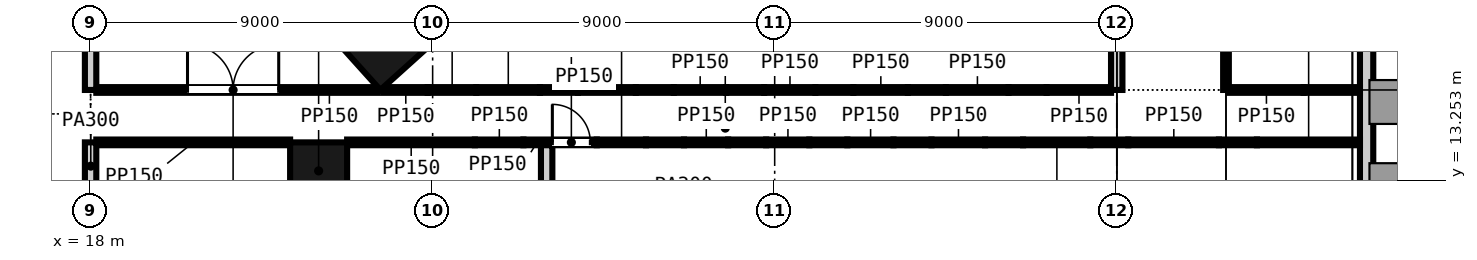
"""IFC4 building model, lengths in metres.
Left out: names, types, materials, properties, quantities, classifications, styles, units other than length and angle.
Written with IfcOpenShell. Run it as: python <this file> out.ifc"""

import sys

from ifc_helpers import new_model, si_unit, direction, frame, frame_2d, origin, origin_2d, place, context, subcontext, project, spatial, rectangle, extrude, element, fill, save


model = new_model("IFC4")
c1 = context("Model", 3, precision=1e-05, world=origin(), true_north=direction((0.0, 1.0)))
c2 = subcontext(c1, "Body", "Model", "MODEL_VIEW")
j1 = project(units=[si_unit("LENGTHUNIT", "METRE"), si_unit("PLANEANGLEUNIT", "RADIAN")], contexts=[c1])
p1 = place(None, origin())
s1 = spatial("IfcSite", under=j1, at=p1, CompositionType="ELEMENT")
p2 = place(p1, origin())
s2 = spatial("IfcBuilding", under=s1, at=p2, CompositionType="ELEMENT")
p3 = place(p2, frame((0.0, 0.0, 9.0)))
s3 = spatial("IfcBuildingStorey", under=s2, at=p3, CompositionType="ELEMENT", Elevation=9.0)
p4 = place(p3, frame((25.691, 16.9, -0.4), z_axis=(0.0, 0.0, 1.0), x_axis=(-0.669130606359, 0.743144825477, 0.0)))
e1 = element("IfcColumn", 1, at=p4, inside=s3, PredefinedType="COLUMN", context=c2, shape_type="SweptSolid", body=[
    extrude(rectangle(XDim=1.8, YDim=1.8, at=origin_2d()), origin(), (0.0, 0.0, 1.0), 9.0),
])
p5 = place(p3, frame((24.0, 13.5, -0.4), z_axis=(0.0, 0.0, 1.0), x_axis=(1.0, 0.0, 0.0)))
e2 = element("IfcColumn", 2, at=p5, inside=s3, PredefinedType="COLUMN", context=c2, shape_type="SweptSolid", body=[
    extrude(rectangle(XDim=1.5, YDim=1.5, at=origin_2d()), origin(), (0.0, 0.0, 1.0), 9.0),
])
p6 = place(p3, frame((51.575, 9.25, -0.4), z_axis=(0.0, 0.0, 1.0), x_axis=(0.0, 1.0, 0.0)))
e3 = element("IfcWall", 3, at=p6, inside=s3, PredefinedType="SOLIDWALL", context=c2, shape_type="SweptSolid", body=[
    extrude(rectangle(XDim=7.75, YDim=0.35, at=frame_2d((3.875, 0.0))), origin(), (0.0, 0.0, 1.0), 8.1),
])
p7 = place(p3, frame((18.15, 14.25, 0.0), z_axis=(0.0, 0.0, 1.0), x_axis=(1.0, 0.0, 0.0)))
e4 = element("IfcWall", 4, at=p7, inside=s3, PredefinedType="PARTITIONING", context=c2, shape_type="SweptSolid", body=[
    extrude(rectangle(XDim=5.1, YDim=0.15, at=frame_2d((2.55, 0.0))), origin(), (0.0, 0.0, 1.0), 8.6),
])
p8 = place(p3, frame((24.75, 14.25, 0.0), z_axis=(0.0, 0.0, 1.0), x_axis=(1.0, 0.0, 0.0)))
e5 = element("IfcWall", 5, at=p8, inside=s3, PredefinedType="PARTITIONING", context=c2, shape_type="SweptSolid", body=[
    extrude(rectangle(XDim=3.361, YDim=0.15, at=frame_2d((1.681, 0.0))), origin(), (0.0, 0.0, 1.0), 8.6),
])
p9 = place(p3, frame((28.111, 14.25, 0.0), z_axis=(0.0, 0.0, 1.0), x_axis=(1.0, 0.0, 0.0)))
e6 = element("IfcWall", 6, at=p9, inside=s3, PredefinedType="PARTITIONING", context=c2, shape_type="SweptSolid", body=[
    extrude(rectangle(XDim=1.278, YDim=0.15, at=frame_2d((0.639, 0.0))), origin(), (0.0, 0.0, 1.0), 7.6),
])
p10 = place(p3, frame((29.389, 14.25, 0.0), z_axis=(0.0, 0.0, 1.0), x_axis=(1.0, 0.0, 0.0)))
e7 = element("IfcWall", 7, at=p10, inside=s3, PredefinedType="PARTITIONING", context=c2, shape_type="SweptSolid", body=[
    extrude(rectangle(XDim=1.929, YDim=0.15, at=frame_2d((0.965, 0.0))), origin(), (0.0, 0.0, 1.0), 7.511),
])
p11 = place(p10, frame((0.76, 0.0, 0.0)))
e8 = element("IfcOpeningElement", 8, at=p11, cuts=e7, PredefinedType="OPENING", context=c2, shape_type="SweptSolid", body=[
    extrude(rectangle(XDim=1.0, YDim=2.1, at=frame_2d((0.5, 1.05))), frame((0.0, 0.085, 0.0), z_axis=(0.0, -1.0, 0.0), x_axis=(1.0, 0.0, 0.0)), (0.0, 0.0, 1.0), 0.17),
])
p12 = place(p3, frame((31.319, 14.25, 0.0), z_axis=(0.0, 0.0, 1.0), x_axis=(1.0, 0.0, 0.0)))
e9 = element("IfcWall", 9, at=p12, inside=s3, PredefinedType="PARTITIONING", context=c2, shape_type="SweptSolid", body=[
    extrude(rectangle(XDim=1.295, YDim=0.15, at=frame_2d((0.648, 0.0))), origin(), (0.0, 0.0, 1.0), 8.6),
])
p13 = place(p3, frame((32.614, 14.25, 0.0), z_axis=(0.0, 0.0, 1.0), x_axis=(1.0, 0.0, 0.0)))
e10 = element("IfcWall", 10, at=p13, inside=s3, PredefinedType="PARTITIONING", context=c2, shape_type="SweptSolid", body=[
    extrude(rectangle(XDim=1.0, YDim=0.15, at=frame_2d((0.5, 0.0))), origin(), (0.0, 0.0, 1.0), 7.511),
])
p14 = place(p3, frame((33.614, 14.25, 0.0), z_axis=(0.0, 0.0, 1.0), x_axis=(1.0, 0.0, 0.0)))
e11 = element("IfcWall", 11, at=p14, inside=s3, PredefinedType="PARTITIONING", context=c2, shape_type="SweptSolid", body=[
    extrude(rectangle(XDim=1.162, YDim=0.15, at=frame_2d((0.581, 0.0))), origin(), (0.0, 0.0, 1.0), 8.6),
])
p15 = place(p3, frame((34.776, 14.25, 0.0), z_axis=(0.0, 0.0, 1.0), x_axis=(1.0, 0.0, 0.0)))
e12 = element("IfcWall", 12, at=p15, inside=s3, PredefinedType="PARTITIONING", context=c2, shape_type="SweptSolid", body=[
    extrude(rectangle(XDim=1.0, YDim=0.15, at=frame_2d((0.5, 0.0))), origin(), (0.0, 0.0, 1.0), 7.511),
])
p16 = place(p3, frame((35.776, 14.25, 0.0), z_axis=(0.0, 0.0, 1.0), x_axis=(1.0, 0.0, 0.0)))
e13 = element("IfcWall", 13, at=p16, inside=s3, PredefinedType="PARTITIONING", context=c2, shape_type="SweptSolid", body=[
    extrude(rectangle(XDim=1.136, YDim=0.15, at=frame_2d((0.568, 0.0))), origin(), (0.0, 0.0, 1.0), 8.6),
])
p17 = place(p3, frame((36.912, 14.25, 0.0), z_axis=(0.0, 0.0, 1.0), x_axis=(1.0, 0.0, 0.0)))
e14 = element("IfcWall", 14, at=p17, inside=s3, PredefinedType="PARTITIONING", context=c2, shape_type="SweptSolid", body=[
    extrude(rectangle(XDim=1.0, YDim=0.15, at=frame_2d((0.5, 0.0))), origin(), (0.0, 0.0, 1.0), 7.511),
])
p18 = place(p3, frame((37.912, 14.25, 0.0), z_axis=(0.0, 0.0, 1.0), x_axis=(1.0, 0.0, 0.0)))
e15 = element("IfcWall", 15, at=p18, inside=s3, PredefinedType="PARTITIONING", context=c2, shape_type="SweptSolid", body=[
    extrude(rectangle(XDim=1.214, YDim=0.15, at=frame_2d((0.607, 0.0))), origin(), (0.0, 0.0, 1.0), 8.6),
])
p19 = place(p3, frame((39.126, 14.25, 0.0), z_axis=(0.0, 0.0, 1.0), x_axis=(1.0, 0.0, 0.0)))
e16 = element("IfcWall", 16, at=p19, inside=s3, PredefinedType="PARTITIONING", context=c2, shape_type="SweptSolid", body=[
    extrude(rectangle(XDim=1.0, YDim=0.15, at=frame_2d((0.5, 0.0))), origin(), (0.0, 0.0, 1.0), 7.511),
])
p20 = place(p3, frame((40.126, 14.25, 0.0), z_axis=(0.0, 0.0, 1.0), x_axis=(1.0, 0.0, 0.0)))
e17 = element("IfcWall", 17, at=p20, inside=s3, PredefinedType="PARTITIONING", context=c2, shape_type="SweptSolid", body=[
    extrude(rectangle(XDim=1.41, YDim=0.15, at=frame_2d((0.705, 0.0))), origin(), (0.0, 0.0, 1.0), 8.6),
])
p21 = place(p3, frame((41.536, 14.25, 0.0), z_axis=(0.0, 0.0, 1.0), x_axis=(1.0, 0.0, 0.0)))
e18 = element("IfcWall", 18, at=p21, inside=s3, PredefinedType="PARTITIONING", context=c2, shape_type="SweptSolid", body=[
    extrude(rectangle(XDim=1.0, YDim=0.15, at=frame_2d((0.5, 0.0))), origin(), (0.0, 0.0, 1.0), 7.511),
])
p22 = place(p3, frame((42.536, 14.25, 0.0), z_axis=(0.0, 0.0, 1.0), x_axis=(1.0, 0.0, 0.0)))
e19 = element("IfcWall", 19, at=p22, inside=s3, PredefinedType="PARTITIONING", context=c2, shape_type="SweptSolid", body=[
    extrude(rectangle(XDim=1.769, YDim=0.15, at=frame_2d((0.884, 0.0))), origin(), (0.0, 0.0, 1.0), 8.6),
])
p23 = place(p3, frame((44.305, 14.25, 0.0), z_axis=(0.0, 0.0, 1.0), x_axis=(1.0, 0.0, 0.0)))
e20 = element("IfcWall", 20, at=p23, inside=s3, PredefinedType="PARTITIONING", context=c2, shape_type="SweptSolid", body=[
    extrude(rectangle(XDim=1.0, YDim=0.15, at=frame_2d((0.5, 0.0))), origin(), (0.0, 0.0, 1.0), 7.511),
])
p24 = place(p3, frame((45.305, 14.25, 0.0), z_axis=(0.0, 0.0, 1.0), x_axis=(1.0, 0.0, 0.0)))
e21 = element("IfcWall", 21, at=p24, inside=s3, PredefinedType="PARTITIONING", context=c2, shape_type="SweptSolid", body=[
    extrude(rectangle(XDim=2.384, YDim=0.15, at=frame_2d((1.192, 0.0))), origin(), (0.0, 0.0, 1.0), 8.6),
])
p25 = place(p3, frame((47.689, 14.25, 0.0), z_axis=(0.0, 0.0, 1.0), x_axis=(1.0, 0.0, 0.0)))
e22 = element("IfcWall", 22, at=p25, inside=s3, PredefinedType="PARTITIONING", context=c2, shape_type="SweptSolid", body=[
    extrude(rectangle(XDim=1.0, YDim=0.15, at=frame_2d((0.5, 0.0))), origin(), (0.0, 0.0, 1.0), 7.686),
])
p26 = place(p3, frame((48.689, 14.25, 0.0), z_axis=(0.0, 0.0, 1.0), x_axis=(1.0, 0.0, 0.0)))
e23 = element("IfcWall", 23, at=p26, inside=s3, PredefinedType="PARTITIONING", context=c2, shape_type="SweptSolid", body=[
    extrude(rectangle(XDim=2.711, YDim=0.15, at=frame_2d((1.355, 0.0))), origin(), (0.0, 0.0, 1.0), 8.6),
])
p27 = place(p3, frame((18.15, 15.629, 0.0), z_axis=(0.0, 0.0, 1.0), x_axis=(1.0, 0.0, 0.0)))
e24 = element("IfcWall", 24, at=p27, inside=s3, PredefinedType="PARTITIONING", context=c2, shape_type="SweptSolid", body=[
    extrude(rectangle(XDim=7.407, YDim=0.15, at=frame_2d((3.704, 0.0))), origin(), (0.0, 0.0, 1.0), 8.6),
])
p28 = place(p27, frame((2.4, 0.0, 0.0)))
e25 = element("IfcOpeningElement", 25, at=p28, cuts=e24, PredefinedType="OPENING", context=c2, shape_type="SweptSolid", body=[
    extrude(rectangle(XDim=2.4, YDim=2.4, at=frame_2d((1.2, 1.2))), frame((0.0, 0.085, 0.0), z_axis=(0.0, -1.0, 0.0), x_axis=(1.0, 0.0, 0.0)), (0.0, 0.0, 1.0), 0.17),
])
p29 = place(p3, frame((25.708, 15.629, 0.0), z_axis=(0.0, 0.0, 1.0), x_axis=(1.0, 0.0, 0.0)))
e26 = element("IfcWall", 26, at=p29, inside=s3, PredefinedType="PARTITIONING", context=c2, shape_type="SweptSolid", body=[
    extrude(rectangle(XDim=1.162, YDim=0.15, at=frame_2d((0.581, 0.0))), origin(), (0.0, 0.0, 1.0), 8.6),
])
p30 = place(p3, frame((26.869, 15.629, 0.0), z_axis=(0.0, 0.0, 1.0), x_axis=(1.0, 0.0, 0.0)))
e27 = element("IfcWall", 27, at=p30, inside=s3, PredefinedType="PARTITIONING", context=c2, shape_type="SweptSolid", body=[
    extrude(rectangle(XDim=1.278, YDim=0.15, at=frame_2d((0.639, 0.0))), origin(), (0.0, 0.0, 1.0), 7.6),
])
p31 = place(p3, frame((28.148, 15.629, 0.0), z_axis=(0.0, 0.0, 1.0), x_axis=(1.0, 0.0, 0.0)))
e28 = element("IfcWall", 28, at=p31, inside=s3, PredefinedType="PARTITIONING", context=c2, shape_type="SweptSolid", body=[
    extrude(rectangle(XDim=1.676, YDim=0.15, at=frame_2d((0.838, 0.0))), origin(), (0.0, 0.0, 1.0), 8.6),
])
p32 = place(p3, frame((29.823, 15.629, 0.0), z_axis=(0.0, 0.0, 1.0), x_axis=(1.0, 0.0, 0.0)))
e29 = element("IfcWall", 29, at=p32, inside=s3, PredefinedType="PARTITIONING", context=c2, shape_type="SweptSolid", body=[
    extrude(rectangle(XDim=1.0, YDim=0.15, at=frame_2d((0.5, 0.0))), origin(), (0.0, 0.0, 1.0), 7.511),
])
p33 = place(p3, frame((30.823, 15.629, 0.0), z_axis=(0.0, 0.0, 1.0), x_axis=(1.0, 0.0, 0.0)))
e30 = element("IfcWall", 30, at=p33, inside=s3, PredefinedType="PARTITIONING", context=c2, shape_type="SweptSolid", body=[
    extrude(rectangle(XDim=1.523, YDim=0.15, at=frame_2d((0.762, 0.0))), origin(), (0.0, 0.0, 1.0), 8.6),
])
p34 = place(p3, frame((32.346, 15.629, 0.0), z_axis=(0.0, 0.0, 1.0), x_axis=(1.0, 0.0, 0.0)))
e31 = element("IfcWall", 31, at=p34, inside=s3, PredefinedType="PARTITIONING", context=c2, shape_type="SweptSolid", body=[
    extrude(rectangle(XDim=1.0, YDim=0.15, at=frame_2d((0.5, 0.0))), origin(), (0.0, 0.0, 1.0), 7.511),
])
p35 = place(p3, frame((33.346, 15.629, 0.0), z_axis=(0.0, 0.0, 1.0), x_axis=(1.0, 0.0, 0.0)))
e32 = element("IfcWall", 32, at=p35, inside=s3, PredefinedType="PARTITIONING", context=c2, shape_type="SweptSolid", body=[
    extrude(rectangle(XDim=1.376, YDim=0.15, at=frame_2d((0.688, 0.0))), origin(), (0.0, 0.0, 1.0), 8.6),
])
p36 = place(p3, frame((34.723, 15.629, 0.0), z_axis=(0.0, 0.0, 1.0), x_axis=(1.0, 0.0, 0.0)))
e33 = element("IfcWall", 33, at=p36, inside=s3, PredefinedType="PARTITIONING", context=c2, shape_type="SweptSolid", body=[
    extrude(rectangle(XDim=1.0, YDim=0.15, at=frame_2d((0.5, 0.0))), origin(), (0.0, 0.0, 1.0), 7.511),
])
p37 = place(p3, frame((35.723, 15.629, 0.0), z_axis=(0.0, 0.0, 1.0), x_axis=(1.0, 0.0, 0.0)))
e34 = element("IfcWall", 34, at=p37, inside=s3, PredefinedType="PARTITIONING", context=c2, shape_type="SweptSolid", body=[
    extrude(rectangle(XDim=1.348, YDim=0.15, at=frame_2d((0.674, 0.0))), origin(), (0.0, 0.0, 1.0), 8.6),
])
p38 = place(p3, frame((37.071, 15.629, 0.0), z_axis=(0.0, 0.0, 1.0), x_axis=(1.0, 0.0, 0.0)))
e35 = element("IfcWall", 35, at=p38, inside=s3, PredefinedType="PARTITIONING", context=c2, shape_type="SweptSolid", body=[
    extrude(rectangle(XDim=1.0, YDim=0.15, at=frame_2d((0.5, 0.0))), origin(), (0.0, 0.0, 1.0), 7.511),
])
p39 = place(p3, frame((38.071, 15.629, 0.0), z_axis=(0.0, 0.0, 1.0), x_axis=(1.0, 0.0, 0.0)))
e36 = element("IfcWall", 36, at=p39, inside=s3, PredefinedType="PARTITIONING", context=c2, shape_type="SweptSolid", body=[
    extrude(rectangle(XDim=1.434, YDim=0.15, at=frame_2d((0.717, 0.0))), origin(), (0.0, 0.0, 1.0), 8.6),
])
p40 = place(p3, frame((39.505, 15.629, 0.0), z_axis=(0.0, 0.0, 1.0), x_axis=(1.0, 0.0, 0.0)))
e37 = element("IfcWall", 37, at=p40, inside=s3, PredefinedType="PARTITIONING", context=c2, shape_type="SweptSolid", body=[
    extrude(rectangle(XDim=1.0, YDim=0.15, at=frame_2d((0.5, 0.0))), origin(), (0.0, 0.0, 1.0), 7.511),
])
p41 = place(p3, frame((40.505, 15.629, 0.0), z_axis=(0.0, 0.0, 1.0), x_axis=(1.0, 0.0, 0.0)))
e38 = element("IfcWall", 38, at=p41, inside=s3, PredefinedType="PARTITIONING", context=c2, shape_type="SweptSolid", body=[
    extrude(rectangle(XDim=1.649, YDim=0.15, at=frame_2d((0.825, 0.0))), origin(), (0.0, 0.0, 1.0), 8.6),
])
p42 = place(p3, frame((42.154, 15.629, 0.0), z_axis=(0.0, 0.0, 1.0), x_axis=(1.0, 0.0, 0.0)))
e39 = element("IfcWall", 39, at=p42, inside=s3, PredefinedType="PARTITIONING", context=c2, shape_type="SweptSolid", body=[
    extrude(rectangle(XDim=1.0, YDim=0.15, at=frame_2d((0.5, 0.0))), origin(), (0.0, 0.0, 1.0), 7.511),
])
p43 = place(p3, frame((43.154, 15.629, 0.0), z_axis=(0.0, 0.0, 1.0), x_axis=(1.0, 0.0, 0.0)))
e40 = element("IfcWall", 40, at=p43, inside=s3, PredefinedType="PARTITIONING", context=c2, shape_type="SweptSolid", body=[
    extrude(rectangle(XDim=1.696, YDim=0.15, at=frame_2d((0.848, 0.0))), origin(), (0.0, 0.0, 1.0), 8.6),
])
p44 = place(p3, frame((47.95, 15.629, 0.0), z_axis=(0.0, 0.0, 1.0), x_axis=(1.0, 0.0, 0.0)))
e41 = element("IfcWall", 41, at=p44, inside=s3, PredefinedType="PARTITIONING", context=c2, shape_type="SweptSolid", body=[
    extrude(rectangle(XDim=1.968, YDim=0.15, at=frame_2d((0.984, 0.0))), origin(), (0.0, 0.0, 1.0), 7.686),
])
p45 = place(p3, frame((49.918, 15.629, 0.0), z_axis=(0.0, 0.0, 1.0), x_axis=(1.0, 0.0, 0.0)))
e42 = element("IfcWall", 42, at=p45, inside=s3, PredefinedType="PARTITIONING", context=c2, shape_type="SweptSolid", body=[
    extrude(rectangle(XDim=1.482, YDim=0.15, at=frame_2d((0.741, 0.0))), origin(), (0.0, 0.0, 1.0), 8.6),
])
p46 = place(p3, frame((18.0, 13.0, 0.0), z_axis=(0.0, 0.0, 1.0), x_axis=(0.0, 1.0, 0.0)))
e43 = element("IfcWall", 43, at=p46, inside=s3, PredefinedType="PARTITIONING", context=c2, shape_type="SweptSolid", body=[
    extrude(rectangle(XDim=1.25, YDim=0.3, at=frame_2d((0.625, 0.0))), origin(), (0.0, 0.0, 1.0), 7.994),
])
p47 = place(p3, frame((18.0, 15.629, 0.0), z_axis=(0.0, 0.0, 1.0), x_axis=(0.0, 1.0, 0.0)))
e44 = element("IfcWall", 44, at=p47, inside=s3, PredefinedType="PARTITIONING", context=c2, shape_type="SweptSolid", body=[
    extrude(rectangle(XDim=4.178, YDim=0.3, at=frame_2d((2.089, 0.0))), origin(), (0.0, 0.0, 1.0), 8.6),
])
p48 = place(p47, frame((2.771, 0.0, 0.0)))
e45 = element("IfcOpeningElement", 45, at=p48, cuts=e44, PredefinedType="OPENING", context=c2, shape_type="SweptSolid", body=[
    extrude(rectangle(XDim=1.0, YDim=2.1, at=frame_2d((0.5, 1.05))), frame((0.0, 0.16, 0.0), z_axis=(0.0, -1.0, 0.0), x_axis=(1.0, 0.0, 0.0)), (0.0, 0.0, 1.0), 0.32),
])
p49 = place(p3, frame((30.0, 12.04, 0.0), z_axis=(0.0, 0.0, 1.0), x_axis=(0.0, 1.0, 0.0)))
e46 = element("IfcWall", 46, at=p49, inside=s3, PredefinedType="PARTITIONING", context=c2, shape_type="SweptSolid", body=[
    extrude(rectangle(XDim=2.135, YDim=0.3, at=frame_2d((1.067, 0.0))), origin(), (0.0, 0.0, 1.0), 7.6),
])
p50 = place(p3, frame((45.0, 15.629, 0.0), z_axis=(0.0, 0.0, 1.0), x_axis=(0.0, 1.0, 0.0)))
e47 = element("IfcWall", 47, at=p50, inside=s3, PredefinedType="PARTITIONING", context=c2, shape_type="SweptSolid", body=[
    extrude(rectangle(XDim=4.376, YDim=0.3, at=frame_2d((2.188, 0.0))), origin(), (0.0, 0.0, 1.0), 8.6),
])
p51 = place(p3, frame((47.875, 15.629, 0.0), z_axis=(0.0, 0.0, 1.0), x_axis=(0.0, 1.0, 0.0)))
e48 = element("IfcWall", 48, at=p51, inside=s3, PredefinedType="PARTITIONING", context=c2, shape_type="SweptSolid", body=[
    extrude(rectangle(XDim=2.855, YDim=0.15, at=frame_2d((1.428, 0.0))), origin(), (0.0, 0.0, 1.0), 8.6),
])
p52 = place(p28, origin())
e49 = element("IfcDoor", 49, at=p52, inside=s3, OperationType="SINGLE_SWING_LEFT", PredefinedType="DOOR", context=c2, shape_type="SweptSolid", body=[
    extrude(rectangle(XDim=2.4, YDim=2.4, at=frame_2d((1.2, 1.2))), frame((0.0, 0.025, 0.0), z_axis=(0.0, -1.0, 0.0), x_axis=(1.0, 0.0, 0.0)), (0.0, 0.0, 1.0), 0.05),
])
fill(e25, e49)
p53 = place(p11, origin())
e50 = element("IfcDoor", 50, at=p53, inside=s3, OperationType="SINGLE_SWING_LEFT", PredefinedType="DOOR", context=c2, shape_type="SweptSolid", body=[
    extrude(rectangle(XDim=1.0, YDim=2.1, at=frame_2d((0.5, 1.05))), frame((0.0, 0.025, 0.0), z_axis=(0.0, -1.0, 0.0), x_axis=(1.0, 0.0, 0.0)), (0.0, 0.0, 1.0), 0.05),
])
fill(e8, e50)
save(model, sys.argv[1])
